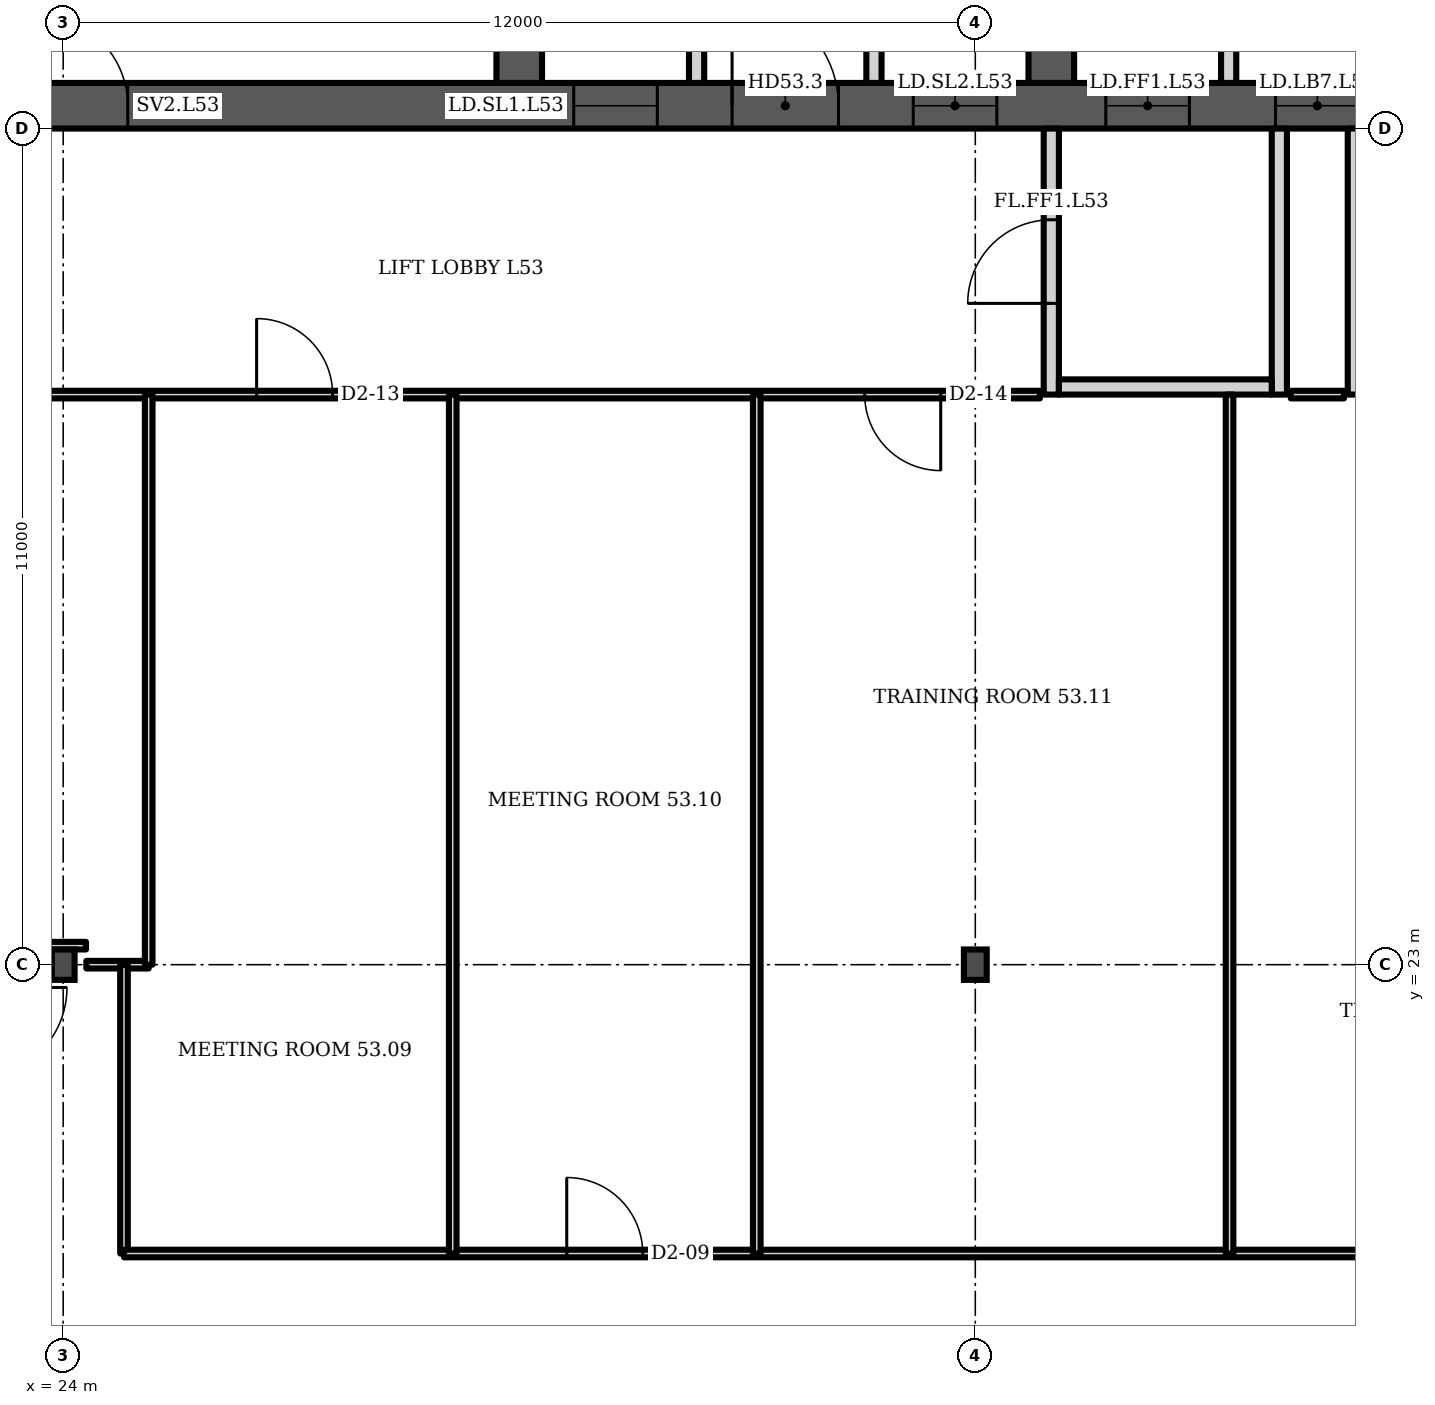
"""IFC4 building model, lengths in metres.
Left out: names, types, materials, properties, quantities, classifications, styles, units other than length and angle.
Written with IfcOpenShell. Run it as: python <this file> out.ifc"""

import sys

from ifc_helpers import new_model, si_unit, direction, frame, frame_2d, origin, origin_2d, place, context, subcontext, project, spatial, polyline, rectangle, i_section, outline, extrude, element, fill, save


model = new_model("IFC4")
c1 = context("Model", 3, precision=1e-05, world=origin(), true_north=direction((0.0, 1.0)))
c2 = subcontext(c1, "Body", "Model", "MODEL_VIEW")
j1 = project(units=[si_unit("LENGTHUNIT", "METRE"), si_unit("PLANEANGLEUNIT", "RADIAN")], contexts=[c1])
p1 = place(None, origin())
s1 = spatial("IfcSite", under=j1, at=p1, CompositionType="ELEMENT")
p2 = place(p1, origin())
s2 = spatial("IfcBuilding", under=s1, at=p2, CompositionType="ELEMENT")
p3 = place(p2, frame((0.0, 0.0, 214.3)))
s3 = spatial("IfcBuildingStorey", under=s2, at=p3, CompositionType="ELEMENT", Elevation=214.3)
p4 = place(p3, frame((23.0, 34.3, 0.0), z_axis=(0.0, 0.0, 1.0), x_axis=(1.0, 0.0, 0.0)))
e1 = element("IfcWall", 1, at=p4, inside=s3, PredefinedType="SHEAR", context=c2, shape_type="SweptSolid", body=[
    extrude(rectangle(XDim=35.0, YDim=0.6, at=frame_2d((17.5, 0.0))), origin(), (0.0, 0.0, 1.0), 3.6),
])
p5 = place(p4, frame((0.65, 0.0, 0.0)))
e2 = element("IfcOpeningElement", 2, at=p5, cuts=e1, PredefinedType="OPENING", context=c2, shape_type="SweptSolid", body=[
    extrude(rectangle(XDim=1.2, YDim=2.1, at=frame_2d((0.6, 1.05))), frame((0.0, 0.31, 0.0), z_axis=(0.0, -1.0, 0.0), x_axis=(1.0, 0.0, 0.0)), (0.0, 0.0, 1.0), 0.62),
])
p6 = place(p4, frame((7.717, 0.0, 0.0)))
e3 = element("IfcOpeningElement", 3, at=p6, cuts=e1, PredefinedType="OPENING", context=c2, shape_type="SweptSolid", body=[
    extrude(rectangle(XDim=1.1, YDim=2.1, at=frame_2d((0.55, 1.05))), frame((0.0, 0.31, 0.0), z_axis=(0.0, -1.0, 0.0), x_axis=(1.0, 0.0, 0.0)), (0.0, 0.0, 1.0), 0.62),
])
p7 = place(p4, frame((12.183, 0.0, 0.0)))
e4 = element("IfcOpeningElement", 4, at=p7, cuts=e1, PredefinedType="OPENING", context=c2, shape_type="SweptSolid", body=[
    extrude(rectangle(XDim=1.1, YDim=2.1, at=frame_2d((0.55, 1.05))), frame((0.0, 0.31, 0.0), z_axis=(0.0, -1.0, 0.0), x_axis=(1.0, 0.0, 0.0)), (0.0, 0.0, 1.0), 0.62),
])
p8 = place(p4, frame((9.8, 0.0, 0.0)))
e5 = element("IfcOpeningElement", 5, at=p8, cuts=e1, PredefinedType="OPENING", context=c2, shape_type="SweptSolid", body=[
    extrude(rectangle(XDim=1.4, YDim=2.1, at=frame_2d((0.7, 1.05))), frame((0.0, 0.31, 0.0), z_axis=(0.0, -1.0, 0.0), x_axis=(1.0, 0.0, 0.0)), (0.0, 0.0, 1.0), 0.62),
])
p9 = place(p4, frame((14.717, 0.0, 0.0)))
e6 = element("IfcOpeningElement", 6, at=p9, cuts=e1, PredefinedType="OPENING", context=c2, shape_type="SweptSolid", body=[
    extrude(rectangle(XDim=1.1, YDim=2.1, at=frame_2d((0.55, 1.05))), frame((0.0, 0.31, 0.0), z_axis=(0.0, -1.0, 0.0), x_axis=(1.0, 0.0, 0.0)), (0.0, 0.0, 1.0), 0.62),
])
p10 = place(p4, frame((16.95, 0.0, 0.0)))
e7 = element("IfcOpeningElement", 7, at=p10, cuts=e1, PredefinedType="OPENING", context=c2, shape_type="SweptSolid", body=[
    extrude(rectangle(XDim=1.1, YDim=2.1, at=frame_2d((0.55, 1.05))), frame((0.0, 0.31, 0.0), z_axis=(0.0, -1.0, 0.0), x_axis=(1.0, 0.0, 0.0)), (0.0, 0.0, 1.0), 0.62),
])
p11 = place(p4, frame((19.183, 0.0, 0.0)))
e8 = element("IfcOpeningElement", 8, at=p11, cuts=e1, PredefinedType="OPENING", context=c2, shape_type="SweptSolid", body=[
    extrude(rectangle(XDim=1.1, YDim=2.1, at=frame_2d((0.55, 1.05))), frame((0.0, 0.31, 0.0), z_axis=(0.0, -1.0, 0.0), x_axis=(1.0, 0.0, 0.0)), (0.0, 0.0, 1.0), 0.62),
])
p12 = place(p4, frame((26.15, 0.0, 0.0)))
e9 = element("IfcOpeningElement", 9, at=p12, cuts=e1, PredefinedType="OPENING", context=c2, shape_type="SweptSolid", body=[
    extrude(rectangle(XDim=1.2, YDim=2.1, at=frame_2d((0.6, 1.05))), frame((0.0, 0.31, 0.0), z_axis=(0.0, -1.0, 0.0), x_axis=(1.0, 0.0, 0.0)), (0.0, 0.0, 1.0), 0.62),
])
p13 = place(p4, frame((30.8, 0.0, 0.0)))
e10 = element("IfcOpeningElement", 10, at=p13, cuts=e1, PredefinedType="OPENING", context=c2, shape_type="SweptSolid", body=[
    extrude(rectangle(XDim=1.4, YDim=2.1, at=frame_2d((0.7, 1.05))), frame((0.0, 0.31, 0.0), z_axis=(0.0, -1.0, 0.0), x_axis=(1.0, 0.0, 0.0)), (0.0, 0.0, 1.0), 0.62),
])
p14 = place(p3, frame((30.0, 34.6, 0.0), z_axis=(0.0, 0.0, 1.0), x_axis=(0.0, 1.0, 0.0)))
e11 = element("IfcWall", 11, at=p14, inside=s3, PredefinedType="SHEAR", context=c2, shape_type="SweptSolid", body=[
    extrude(rectangle(XDim=14.171, YDim=0.6, at=frame_2d((7.085, 0.0))), origin(), (0.0, 0.0, 1.0), 3.6),
])
p15 = place(p14, frame((3.8, 0.0, 0.0)))
e12 = element("IfcOpeningElement", 12, at=p15, cuts=e11, PredefinedType="OPENING", context=c2, shape_type="SweptSolid", body=[
    extrude(rectangle(XDim=1.1, YDim=2.1, at=frame_2d((0.55, 1.05))), frame((0.0, 0.31, 0.0), z_axis=(0.0, -1.0, 0.0), x_axis=(1.0, 0.0, 0.0)), (0.0, 0.0, 1.0), 0.62),
])
p16 = place(p3, frame((37.0, 34.6, 0.0), z_axis=(0.0, 0.0, 1.0), x_axis=(0.0, 1.0, 0.0)))
e13 = element("IfcWall", 13, at=p16, inside=s3, PredefinedType="SHEAR", context=c2, shape_type="SweptSolid", body=[
    extrude(rectangle(XDim=14.784, YDim=0.6, at=frame_2d((7.392, 0.0))), origin(), (0.0, 0.0, 1.0), 3.6),
])
p17 = place(p16, frame((11.302, 0.0, 0.0)))
e14 = element("IfcOpeningElement", 14, at=p17, cuts=e13, PredefinedType="OPENING", context=c2, shape_type="SweptSolid", body=[
    extrude(rectangle(XDim=1.0, YDim=2.1, at=frame_2d((0.5, 1.05))), frame((0.0, 0.31, 0.0), z_axis=(0.0, -1.0, 0.0), x_axis=(1.0, 0.0, 0.0)), (0.0, 0.0, 1.0), 0.62),
])
p18 = place(p16, frame((3.8, 0.0, 0.0)))
e15 = element("IfcOpeningElement", 15, at=p18, cuts=e13, PredefinedType="OPENING", context=c2, shape_type="SweptSolid", body=[
    extrude(rectangle(XDim=1.1, YDim=2.1, at=frame_2d((0.55, 1.05))), frame((0.0, 0.31, 0.0), z_axis=(0.0, -1.0, 0.0), x_axis=(1.0, 0.0, 0.0)), (0.0, 0.0, 1.0), 0.62),
])
for number, where, z_axis, x_axis in (
    (16, (24.0, 23.0, 0.0), (0.0, 0.0, 1.0), (1.0, 0.0, 0.0)),
    (17, (36.0, 23.0, 0.0), (0.0, 0.0, 1.0), (1.0, 0.0, 0.0)),
):
    element("IfcColumn", number, at=place(p3, frame(where, z_axis=z_axis, x_axis=x_axis)), inside=s3, PredefinedType="COLUMN", context=c2, shape_type="SweptSolid", body=[
        extrude(i_section(OverallWidth=0.3, OverallDepth=0.4, WebThickness=0.013, FlangeThickness=0.024, FilletRadius=0.027, at=origin_2d()), origin(), (0.0, 0.0, 1.0), 3.6),
    ])
p19 = place(p3, frame((0.0, 0.0, -0.0)))
e18 = element("IfcWall", 18, at=p19, inside=s3, PredefinedType="PARTITIONING", context=c2, shape_type="SweptSolid", body=[
    extrude(outline(polyline([(32.233, 37.45), (30.3, 37.45), (30.3, 37.65), (32.233, 37.65), (32.433, 37.65), (32.433, 34.6), (32.233, 34.6), (32.233, 37.45)])), origin(), (0.0, 0.0, 1.0), 3.2),
])
p20 = place(p3, frame((0.0, 0.0, -0.0)))
e19 = element("IfcWall", 19, at=p20, inside=s3, PredefinedType="PARTITIONING", context=c2, shape_type="SweptSolid", body=[
    extrude(outline(polyline([(34.567, 37.65), (34.767, 37.65), (36.7, 37.65), (36.7, 37.45), (34.767, 37.45), (34.767, 34.6), (34.567, 34.6), (34.567, 37.65)])), origin(), (0.0, 0.0, 1.0), 3.2),
])
p21 = place(p3, frame((0.0, 0.0, -0.0)))
e20 = element("IfcWall", 20, at=p21, inside=s3, PredefinedType="PARTITIONING", context=c2, shape_type="SweptSolid", body=[
    extrude(outline(polyline([(41.567, 37.1), (39.433, 37.1), (39.433, 34.6), (39.233, 34.6), (39.233, 37.45), (37.3, 37.45), (37.3, 37.65), (39.233, 37.65), (39.433, 37.65), (39.433, 37.3), (41.567, 37.3), (41.567, 37.35), (41.767, 37.35), (43.7, 37.35), (43.7, 37.15), (41.767, 37.15), (41.767, 34.6), (41.567, 34.6), (41.567, 37.1)])), origin(), (0.0, 0.0, 1.0), 3.2),
])
p22 = place(p3, frame((37.0, 30.5, 0.0), z_axis=(0.0, 0.0, 1.0), x_axis=(0.0, 1.0, 0.0)))
e21 = element("IfcWall", 21, at=p22, inside=s3, PredefinedType="PARTITIONING", context=c2, shape_type="SweptSolid", body=[
    extrude(rectangle(XDim=3.5, YDim=0.2, at=frame_2d((1.75, 0.0))), origin(), (0.0, 0.0, 1.0), 3.2),
])
p23 = place(p22, frame((1.2, 0.0, 0.0)))
e22 = element("IfcOpeningElement", 22, at=p23, cuts=e21, PredefinedType="OPENING", context=c2, shape_type="SweptSolid", body=[
    extrude(rectangle(XDim=1.1, YDim=2.1, at=frame_2d((0.55, 1.05))), frame((0.0, 0.11, 0.0), z_axis=(0.0, -1.0, 0.0), x_axis=(1.0, 0.0, 0.0)), (0.0, 0.0, 1.0), 0.22),
])
p24 = place(p3, frame((40.0, 30.5, 0.0), z_axis=(0.0, 0.0, 1.0), x_axis=(0.0, 1.0, 0.0)))
e23 = element("IfcWall", 23, at=p24, inside=s3, PredefinedType="PARTITIONING", context=c2, shape_type="SweptSolid", body=[
    extrude(rectangle(XDim=3.5, YDim=0.2, at=frame_2d((1.75, 0.0))), origin(), (0.0, 0.0, 1.0), 3.2),
])
p25 = place(p3, frame((37.1, 30.6, 0.0), z_axis=(0.0, 0.0, 1.0), x_axis=(1.0, 0.0, 0.0)))
e24 = element("IfcWall", 24, at=p25, inside=s3, PredefinedType="PARTITIONING", context=c2, shape_type="SweptSolid", body=[
    extrude(rectangle(XDim=2.8, YDim=0.2, at=frame_2d((1.4, 0.0))), origin(), (0.0, 0.0, 1.0), 3.2),
])
p26 = place(p3, frame((41.0, 30.5, 0.0), z_axis=(0.0, 0.0, 1.0), x_axis=(0.0, 1.0, 0.0)))
e25 = element("IfcWall", 25, at=p26, inside=s3, PredefinedType="PARTITIONING", context=c2, shape_type="SweptSolid", body=[
    extrude(rectangle(XDim=3.5, YDim=0.2, at=frame_2d((1.75, 0.0))), origin(), (0.0, 0.0, 1.0), 3.2),
])
p27 = place(p3, frame((23.0, 30.5, 0.0), z_axis=(0.0, 0.0, 1.0), x_axis=(1.0, 0.0, 0.0)))
e26 = element("IfcWall", 26, at=p27, inside=s3, PredefinedType="PARTITIONING", context=c2, shape_type="SweptSolid", body=[
    extrude(rectangle(XDim=13.85, YDim=0.1, at=frame_2d((6.925, 0.0))), origin(), (0.0, 0.0, 1.0), 3.2),
])
p28 = place(p27, frame((3.545, 0.0, 0.0)))
e27 = element("IfcOpeningElement", 27, at=p28, cuts=e26, PredefinedType="OPENING", context=c2, shape_type="SweptSolid", body=[
    extrude(rectangle(XDim=1.0, YDim=2.1, at=frame_2d((0.5, 1.05))), frame((0.0, 0.06, 0.0), z_axis=(0.0, -1.0, 0.0), x_axis=(1.0, 0.0, 0.0)), (0.0, 0.0, 1.0), 0.12),
])
p29 = place(p27, frame((11.545, 0.0, 0.0)))
e28 = element("IfcOpeningElement", 28, at=p29, cuts=e26, PredefinedType="OPENING", context=c2, shape_type="SweptSolid", body=[
    extrude(rectangle(XDim=1.0, YDim=2.1, at=frame_2d((0.5, 1.05))), frame((0.0, 0.06, 0.0), z_axis=(0.0, -1.0, 0.0), x_axis=(1.0, 0.0, 0.0)), (0.0, 0.0, 1.0), 0.12),
])
p30 = place(p3, frame((23.02, 23.25, 0.0), z_axis=(0.0, 0.0, 1.0), x_axis=(1.0, 0.0, 0.0)))
e29 = element("IfcWall", 29, at=p30, inside=s3, PredefinedType="PARTITIONING", context=c2, shape_type="SweptSolid", body=[
    extrude(rectangle(XDim=1.28, YDim=0.1, at=frame_2d((0.64, 0.0))), origin(), (0.0, 0.0, 1.0), 3.2),
])
p31 = place(p3, frame((24.305, 23.0, 0.0), z_axis=(0.0, 0.0, 1.0), x_axis=(1.0, 0.0, 0.0)))
e30 = element("IfcWall", 30, at=p31, inside=s3, PredefinedType="PARTITIONING", context=c2, shape_type="SweptSolid", body=[
    extrude(rectangle(XDim=0.82, YDim=0.1, at=frame_2d((0.41, 0.0))), origin(), (0.0, 0.0, 1.0), 3.2),
])
p32 = place(p3, frame((24.8, 19.2, 0.0), z_axis=(0.0, 0.0, 1.0), x_axis=(0.0, 1.0, 0.0)))
e31 = element("IfcWall", 31, at=p32, inside=s3, PredefinedType="PARTITIONING", context=c2, shape_type="SweptSolid", body=[
    extrude(rectangle(XDim=3.8, YDim=0.1, at=frame_2d((1.9, 0.0))), origin(), (0.0, 0.0, 1.0), 3.2),
])
p33 = place(p3, frame((24.8, 19.2, 0.0), z_axis=(0.0, 0.0, 1.0), x_axis=(1.0, 0.0, 0.0)))
e32 = element("IfcWall", 32, at=p33, inside=s3, PredefinedType="PARTITIONING", context=c2, shape_type="SweptSolid", body=[
    extrude(rectangle(XDim=20.76, YDim=0.1, at=frame_2d((10.38, 0.0))), origin(), (0.0, 0.0, 1.0), 3.2),
])
p34 = place(p33, frame((5.825, 0.0, 0.0)))
e33 = element("IfcOpeningElement", 33, at=p34, cuts=e32, PredefinedType="OPENING", context=c2, shape_type="SweptSolid", body=[
    extrude(rectangle(XDim=1.0, YDim=2.1, at=frame_2d((0.5, 1.05))), frame((0.0, 0.06, 0.0), z_axis=(0.0, -1.0, 0.0), x_axis=(1.0, 0.0, 0.0)), (0.0, 0.0, 1.0), 0.12),
])
p35 = place(p3, frame((25.125, 23.0, 0.0), z_axis=(0.0, 0.0, 1.0), x_axis=(0.0, 1.0, 0.0)))
e34 = element("IfcWall", 34, at=p35, inside=s3, PredefinedType="PARTITIONING", context=c2, shape_type="SweptSolid", body=[
    extrude(rectangle(XDim=7.5, YDim=0.1, at=frame_2d((3.75, 0.0))), origin(), (0.0, 0.0, 1.0), 3.2),
])
for number, where, z_axis, x_axis in (
    (35, (29.125, 19.2, 0.0), (0.0, 0.0, 1.0), (0.0, 1.0, 0.0)),
    (36, (33.125, 19.2, 0.0), (0.0, 0.0, 1.0), (0.0, 1.0, 0.0)),
    (37, (39.345, 19.2, 0.0), (0.0, 0.0, 1.0), (0.0, 1.0, 0.0)),
):
    element("IfcWall", number, at=place(p3, frame(where, z_axis=z_axis, x_axis=x_axis)), inside=s3, PredefinedType="PARTITIONING", context=c2, shape_type="SweptSolid", body=[
        extrude(rectangle(XDim=11.3, YDim=0.1, at=frame_2d((5.65, 0.0))), origin(), (0.0, 0.0, 1.0), 3.2),
    ])
p36 = place(p3, frame((40.15, 30.5, 0.0), z_axis=(0.0, 0.0, 1.0), x_axis=(1.0, 0.0, 0.0)))
e38 = element("IfcWall", 38, at=p36, inside=s3, PredefinedType="PARTITIONING", context=c2, shape_type="SweptSolid", body=[
    extrude(rectangle(XDim=0.7, YDim=0.1, at=frame_2d((0.35, 0.0))), origin(), (0.0, 0.0, 1.0), 3.2),
])
p37 = place(p5, origin())
e39 = element("IfcDoor", 39, at=p37, inside=s3, OperationType="SINGLE_SWING_LEFT", PredefinedType="DOOR", context=c2, shape_type="SweptSolid", body=[
    extrude(rectangle(XDim=1.2, YDim=2.1, at=frame_2d((0.6, 1.05))), frame((0.0, 0.025, 0.0), z_axis=(0.0, -1.0, 0.0), x_axis=(1.0, 0.0, 0.0)), (0.0, 0.0, 1.0), 0.05),
])
fill(e2, e39)
p38 = place(p6, origin())
e40 = element("IfcDoor", 40, at=p38, inside=s3, OperationType="DOUBLE_DOOR_SLIDING", PredefinedType="DOOR", context=c2, shape_type="SweptSolid", body=[
    extrude(rectangle(XDim=1.1, YDim=2.1, at=frame_2d((0.55, 1.05))), frame((0.0, 0.025, 0.0), z_axis=(0.0, -1.0, 0.0), x_axis=(1.0, 0.0, 0.0)), (0.0, 0.0, 1.0), 0.05),
])
fill(e3, e40)
p39 = place(p7, origin())
e41 = element("IfcDoor", 41, at=p39, inside=s3, OperationType="DOUBLE_DOOR_SLIDING", PredefinedType="DOOR", context=c2, shape_type="SweptSolid", body=[
    extrude(rectangle(XDim=1.1, YDim=2.1, at=frame_2d((0.55, 1.05))), frame((0.0, 0.025, 0.0), z_axis=(0.0, -1.0, 0.0), x_axis=(1.0, 0.0, 0.0)), (0.0, 0.0, 1.0), 0.05),
])
fill(e4, e41)
p40 = place(p8, origin())
e42 = element("IfcDoor", 42, at=p40, inside=s3, OperationType="DOUBLE_DOOR_SINGLE_SWING", PredefinedType="DOOR", context=c2, shape_type="SweptSolid", body=[
    extrude(rectangle(XDim=1.4, YDim=2.1, at=frame_2d((0.7, 1.05))), frame((0.0, 0.025, 0.0), z_axis=(0.0, -1.0, 0.0), x_axis=(1.0, 0.0, 0.0)), (0.0, 0.0, 1.0), 0.05),
])
fill(e5, e42)
p41 = place(p9, origin())
e43 = element("IfcDoor", 43, at=p41, inside=s3, OperationType="DOUBLE_DOOR_SLIDING", PredefinedType="DOOR", context=c2, shape_type="SweptSolid", body=[
    extrude(rectangle(XDim=1.1, YDim=2.1, at=frame_2d((0.55, 1.05))), frame((0.0, 0.025, 0.0), z_axis=(0.0, -1.0, 0.0), x_axis=(1.0, 0.0, 0.0)), (0.0, 0.0, 1.0), 0.05),
])
fill(e6, e43)
p42 = place(p10, origin())
e44 = element("IfcDoor", 44, at=p42, inside=s3, OperationType="DOUBLE_DOOR_SLIDING", PredefinedType="DOOR", context=c2, shape_type="SweptSolid", body=[
    extrude(rectangle(XDim=1.1, YDim=2.1, at=frame_2d((0.55, 1.05))), frame((0.0, 0.025, 0.0), z_axis=(0.0, -1.0, 0.0), x_axis=(1.0, 0.0, 0.0)), (0.0, 0.0, 1.0), 0.05),
])
fill(e7, e44)
p43 = place(p23, origin())
e45 = element("IfcDoor", 45, at=p43, inside=s3, OperationType="SINGLE_SWING_LEFT", PredefinedType="DOOR", context=c2, shape_type="SweptSolid", body=[
    extrude(rectangle(XDim=1.1, YDim=2.1, at=frame_2d((0.55, 1.05))), frame((0.0, 0.025, 0.0), z_axis=(0.0, -1.0, 0.0), x_axis=(1.0, 0.0, 0.0)), (0.0, 0.0, 1.0), 0.05),
])
fill(e22, e45)
p44 = place(p34, origin())
e46 = element("IfcDoor", 46, at=p44, inside=s3, OperationType="SINGLE_SWING_LEFT", PredefinedType="DOOR", context=c2, shape_type="SweptSolid", body=[
    extrude(rectangle(XDim=1.0, YDim=2.1, at=frame_2d((0.5, 1.05))), frame((0.0, 0.025, 0.0), z_axis=(0.0, -1.0, 0.0), x_axis=(1.0, 0.0, 0.0)), (0.0, 0.0, 1.0), 0.05),
])
fill(e33, e46)
p45 = place(p28, origin())
e47 = element("IfcDoor", 47, at=p45, inside=s3, OperationType="SINGLE_SWING_LEFT", PredefinedType="DOOR", context=c2, shape_type="SweptSolid", body=[
    extrude(rectangle(XDim=1.0, YDim=2.1, at=frame_2d((0.5, 1.05))), frame((0.0, 0.025, 0.0), z_axis=(0.0, -1.0, 0.0), x_axis=(1.0, 0.0, 0.0)), (0.0, 0.0, 1.0), 0.05),
])
fill(e27, e47)
p46 = place(p29, origin())
e48 = element("IfcDoor", 48, at=p46, inside=s3, OperationType="SINGLE_SWING_RIGHT", PredefinedType="DOOR", context=c2, shape_type="SweptSolid", body=[
    extrude(rectangle(XDim=1.0, YDim=2.1, at=frame_2d((0.5, 1.05))), frame((0.0, 0.025, 0.0), z_axis=(0.0, -1.0, 0.0), x_axis=(1.0, 0.0, 0.0)), (0.0, 0.0, 1.0), 0.05),
])
fill(e28, e48)
save(model, sys.argv[1])
